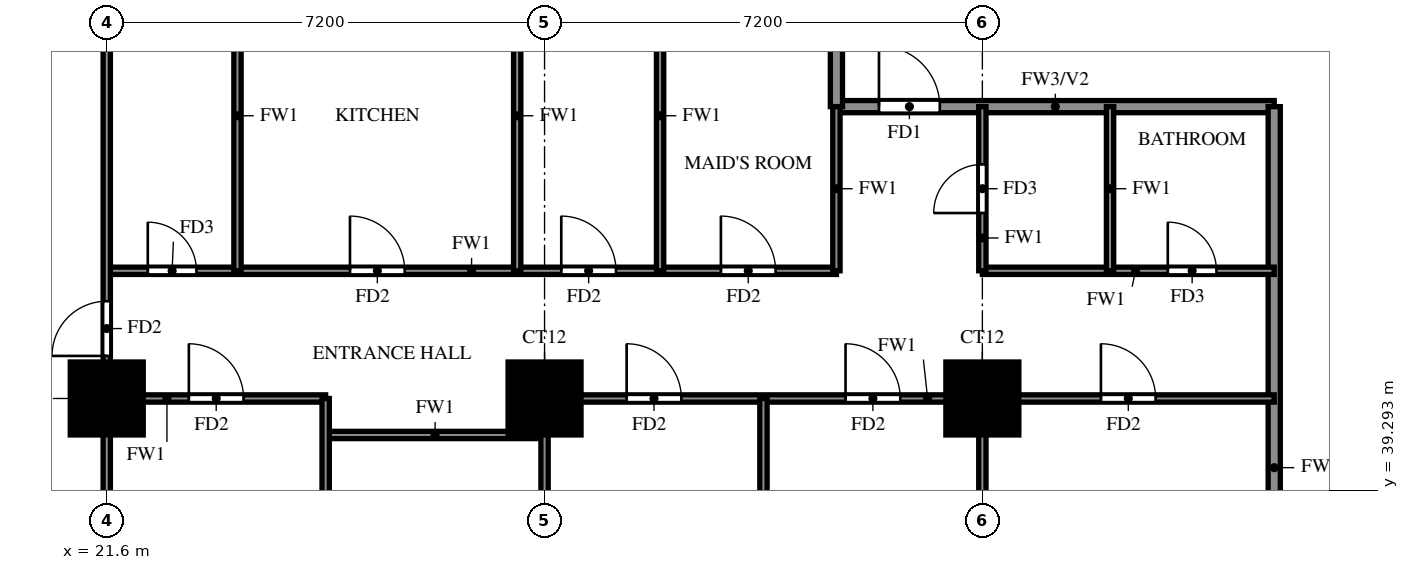
"""IFC4 building model, lengths in metres.
Left out: names, types, materials, properties, quantities, classifications, styles, units other than length and angle.
Written with IfcOpenShell. Run it as: python <this file> out.ifc"""

import sys

from ifc_helpers import new_model, si_unit, direction, frame, frame_2d, origin, origin_2d, place, context, subcontext, project, spatial, rectangle, extrude, source, transform, mapped, element, fill, save


model = new_model("IFC4")
c1 = context("Model", 3, precision=1e-05, world=origin(), true_north=direction((0.0, 1.0)))
c2 = subcontext(c1, "Body", "Model", "MODEL_VIEW")
j1 = project(units=[si_unit("LENGTHUNIT", "METRE"), si_unit("PLANEANGLEUNIT", "RADIAN")], contexts=[c1])
p1 = place(None, origin())
s1 = spatial("IfcSite", under=j1, at=p1, CompositionType="ELEMENT")
p2 = place(p1, origin())
s2 = spatial("IfcBuilding", under=s1, at=p2, CompositionType="ELEMENT")
p3 = place(p2, frame((0.0, 0.0, 93.5)))
s3 = spatial("IfcBuildingStorey", under=s2, at=p3, CompositionType="ELEMENT", Elevation=93.5)
m1 = source(origin(), c2, "Body", "SweptSolid", [
    extrude(rectangle(XDim=1.2, YDim=1.2, at=origin_2d()), origin(), (0.0, 0.0, 1.0), 3.18),
])
for number, where, z_axis, x_axis in (
    (1, (21.6, 40.8, 0.0), (0.0, 0.0, 1.0), (1.0, 0.0, 0.0)),
    (2, (28.8, 40.8, 0.0), (0.0, 0.0, 1.0), (1.0, 0.0, 0.0)),
    (3, (36.0, 40.8, 0.0), (0.0, 0.0, 1.0), (1.0, 0.0, 0.0)),
):
    element("IfcColumn", number, at=place(p3, frame(where, z_axis=z_axis, x_axis=x_axis)), inside=s3, PredefinedType="COLUMN", context=c2, shape_type="MappedRepresentation", body=[
        mapped(m1, transform((0.0, 0.0, 0.0))),
    ])
p4 = place(p3, frame((33.6, 45.6, 0.0), z_axis=(0.0, 0.0, 1.0), x_axis=(1.0, 0.0, 0.0)))
e4 = element("IfcWall", 4, at=p4, inside=s3, PredefinedType="SOLIDWALL", context=c2, shape_type="SweptSolid", body=[
    extrude(rectangle(XDim=7.2, YDim=0.2, at=frame_2d((3.6, 0.0))), origin(), (0.0, 0.0, 1.0), 3.18),
])
p5 = place(p4, frame((0.7, 0.0, 0.0)))
e5 = element("IfcOpeningElement", 5, at=p5, cuts=e4, PredefinedType="OPENING", context=c2, shape_type="SweptSolid", body=[
    extrude(rectangle(XDim=1.0, YDim=2.1, at=frame_2d((0.5, 1.05))), frame((0.0, 0.11, 0.0), z_axis=(0.0, -1.0, 0.0), x_axis=(1.0, 0.0, 0.0)), (0.0, 0.0, 1.0), 0.22),
])
p6 = place(p3, frame((33.6, 45.6, 0.0), z_axis=(0.0, 0.0, 1.0), x_axis=(0.0, 1.0, 0.0)))
e6 = element("IfcWall", 6, at=p6, inside=s3, PredefinedType="SOLIDWALL", context=c2, shape_type="SweptSolid", body=[
    extrude(rectangle(XDim=8.4, YDim=0.2, at=frame_2d((4.2, 0.0))), origin(), (0.0, 0.0, 1.0), 3.18),
])
p7 = place(p3, frame((40.8, 33.725, 0.0), z_axis=(0.0, 0.0, 1.0), x_axis=(0.0, 1.0, 0.0)))
e7 = element("IfcWall", 7, at=p7, inside=s3, PredefinedType="SOLIDWALL", context=c2, shape_type="SweptSolid", body=[
    extrude(rectangle(XDim=11.875, YDim=0.2, at=frame_2d((5.938, 0.0))), origin(), (0.0, 0.0, 1.0), 2.28),
])
p8 = place(p3, frame((25.2, 40.2, 0.0), z_axis=(0.0, 0.0, 1.0), x_axis=(1.0, 0.0, 0.0)))
e8 = element("IfcWall", 8, at=p8, inside=s3, PredefinedType="PARTITIONING", context=c2, shape_type="SweptSolid", body=[
    extrude(rectangle(XDim=3.6, YDim=0.12, at=frame_2d((1.8, 0.0))), origin(), (0.0, 0.0, 1.0), 3.18),
])
p9 = place(p3, frame((21.6, 40.8, 0.0), z_axis=(0.0, 0.0, 1.0), x_axis=(1.0, 0.0, 0.0)))
e9 = element("IfcWall", 9, at=p9, inside=s3, PredefinedType="PARTITIONING", context=c2, shape_type="SweptSolid", body=[
    extrude(rectangle(XDim=3.6, YDim=0.12, at=frame_2d((1.8, 0.0))), origin(), (0.0, 0.0, 1.0), 3.18),
])
p10 = place(p9, frame((1.35, 0.0, 0.0)))
e10 = element("IfcOpeningElement", 10, at=p10, cuts=e9, PredefinedType="OPENING", context=c2, shape_type="SweptSolid", body=[
    extrude(rectangle(XDim=0.9, YDim=2.1, at=frame_2d((0.45, 1.05))), frame((0.0, 0.07, 0.0), z_axis=(0.0, -1.0, 0.0), x_axis=(1.0, 0.0, 0.0)), (0.0, 0.0, 1.0), 0.14),
])
p11 = place(p3, frame((28.8, 40.8, 0.0), z_axis=(0.0, 0.0, 1.0), x_axis=(1.0, 0.0, 0.0)))
e11 = element("IfcWall", 11, at=p11, inside=s3, PredefinedType="PARTITIONING", context=c2, shape_type="SweptSolid", body=[
    extrude(rectangle(XDim=12.0, YDim=0.12, at=frame_2d((6.0, 0.0))), origin(), (0.0, 0.0, 1.0), 3.18),
])
p12 = place(p11, frame((1.35, 0.0, 0.0)))
e12 = element("IfcOpeningElement", 12, at=p12, cuts=e11, PredefinedType="OPENING", context=c2, shape_type="SweptSolid", body=[
    extrude(rectangle(XDim=0.9, YDim=2.1, at=frame_2d((0.45, 1.05))), frame((0.0, 0.07, 0.0), z_axis=(0.0, -1.0, 0.0), x_axis=(1.0, 0.0, 0.0)), (0.0, 0.0, 1.0), 0.14),
])
p13 = place(p11, frame((4.95, 0.0, 0.0)))
e13 = element("IfcOpeningElement", 13, at=p13, cuts=e11, PredefinedType="OPENING", context=c2, shape_type="SweptSolid", body=[
    extrude(rectangle(XDim=0.9, YDim=2.1, at=frame_2d((0.45, 1.05))), frame((0.0, 0.07, 0.0), z_axis=(0.0, -1.0, 0.0), x_axis=(1.0, 0.0, 0.0)), (0.0, 0.0, 1.0), 0.14),
])
p14 = place(p11, frame((9.15, 0.0, 0.0)))
e14 = element("IfcOpeningElement", 14, at=p14, cuts=e11, PredefinedType="OPENING", context=c2, shape_type="SweptSolid", body=[
    extrude(rectangle(XDim=0.9, YDim=2.1, at=frame_2d((0.45, 1.05))), frame((0.0, 0.07, 0.0), z_axis=(0.0, -1.0, 0.0), x_axis=(1.0, 0.0, 0.0)), (0.0, 0.0, 1.0), 0.14),
])
p15 = place(p3, frame((21.6, 42.9, 0.0), z_axis=(0.0, 0.0, 1.0), x_axis=(1.0, 0.0, 0.0)))
e15 = element("IfcWall", 15, at=p15, inside=s3, PredefinedType="PARTITIONING", context=c2, shape_type="SweptSolid", body=[
    extrude(rectangle(XDim=12.0, YDim=0.12, at=frame_2d((6.0, 0.0))), origin(), (0.0, 0.0, 1.0), 3.18),
])
p16 = place(p15, frame((0.675, 0.0, 0.0)))
e16 = element("IfcOpeningElement", 16, at=p16, cuts=e15, PredefinedType="OPENING", context=c2, shape_type="SweptSolid", body=[
    extrude(rectangle(XDim=0.8, YDim=2.1, at=frame_2d((0.4, 1.05))), frame((0.0, 0.07, 0.0), z_axis=(0.0, -1.0, 0.0), x_axis=(1.0, 0.0, 0.0)), (0.0, 0.0, 1.0), 0.14),
])
p17 = place(p15, frame((4.0, 0.0, 0.0)))
e17 = element("IfcOpeningElement", 17, at=p17, cuts=e15, PredefinedType="OPENING", context=c2, shape_type="SweptSolid", body=[
    extrude(rectangle(XDim=0.9, YDim=2.1, at=frame_2d((0.45, 1.05))), frame((0.0, 0.07, 0.0), z_axis=(0.0, -1.0, 0.0), x_axis=(1.0, 0.0, 0.0)), (0.0, 0.0, 1.0), 0.14),
])
p18 = place(p15, frame((7.475, 0.0, 0.0)))
e18 = element("IfcOpeningElement", 18, at=p18, cuts=e15, PredefinedType="OPENING", context=c2, shape_type="SweptSolid", body=[
    extrude(rectangle(XDim=0.9, YDim=2.1, at=frame_2d((0.45, 1.05))), frame((0.0, 0.07, 0.0), z_axis=(0.0, -1.0, 0.0), x_axis=(1.0, 0.0, 0.0)), (0.0, 0.0, 1.0), 0.14),
])
p19 = place(p15, frame((10.1, 0.0, 0.0)))
e19 = element("IfcOpeningElement", 19, at=p19, cuts=e15, PredefinedType="OPENING", context=c2, shape_type="SweptSolid", body=[
    extrude(rectangle(XDim=0.9, YDim=2.1, at=frame_2d((0.45, 1.05))), frame((0.0, 0.07, 0.0), z_axis=(0.0, -1.0, 0.0), x_axis=(1.0, 0.0, 0.0)), (0.0, 0.0, 1.0), 0.14),
])
p20 = place(p3, frame((36.0, 42.9, 0.0), z_axis=(0.0, 0.0, 1.0), x_axis=(1.0, 0.0, 0.0)))
e20 = element("IfcWall", 20, at=p20, inside=s3, PredefinedType="PARTITIONING", context=c2, shape_type="SweptSolid", body=[
    extrude(rectangle(XDim=4.8, YDim=0.12, at=frame_2d((2.4, 0.0))), origin(), (0.0, 0.0, 1.0), 3.18),
])
p21 = place(p20, frame((3.05, 0.0, 0.0)))
e21 = element("IfcOpeningElement", 21, at=p21, cuts=e20, PredefinedType="OPENING", context=c2, shape_type="SweptSolid", body=[
    extrude(rectangle(XDim=0.8, YDim=2.1, at=frame_2d((0.4, 1.05))), frame((0.0, 0.07, 0.0), z_axis=(0.0, -1.0, 0.0), x_axis=(1.0, 0.0, 0.0)), (0.0, 0.0, 1.0), 0.14),
])
p22 = place(p3, frame((21.6, 33.725, 0.0), z_axis=(0.0, 0.0, 1.0), x_axis=(0.0, 1.0, 0.0)))
e22 = element("IfcWall", 22, at=p22, inside=s3, PredefinedType="PARTITIONING", context=c2, shape_type="SweptSolid", body=[
    extrude(rectangle(XDim=28.675, YDim=0.12, at=frame_2d((14.337, 0.0))), origin(), (0.0, 0.0, 1.0), 3.18),
])
p23 = place(p22, frame((7.775, 0.0, 0.0)))
e23 = element("IfcOpeningElement", 23, at=p23, cuts=e22, PredefinedType="OPENING", context=c2, shape_type="SweptSolid", body=[
    extrude(rectangle(XDim=0.9, YDim=2.1, at=frame_2d((0.45, 1.05))), frame((0.0, 0.07, 0.0), z_axis=(0.0, -1.0, 0.0), x_axis=(1.0, 0.0, 0.0)), (0.0, 0.0, 1.0), 0.14),
])
p24 = place(p22, frame((17.125, 0.0, 0.0)))
e24 = element("IfcOpeningElement", 24, at=p24, cuts=e22, PredefinedType="OPENING", context=c2, shape_type="SweptSolid", body=[
    extrude(rectangle(XDim=1.5, YDim=2.1, at=frame_2d((0.75, 1.05))), frame((0.0, 0.07, 0.0), z_axis=(0.0, -1.0, 0.0), x_axis=(1.0, 0.0, 0.0)), (0.0, 0.0, 1.0), 0.14),
])
p25 = place(p22, frame((22.825, 0.0, 0.0)))
e25 = element("IfcOpeningElement", 25, at=p25, cuts=e22, PredefinedType="OPENING", context=c2, shape_type="SweptSolid", body=[
    extrude(rectangle(XDim=0.9, YDim=2.1, at=frame_2d((0.45, 1.05))), frame((0.0, 0.07, 0.0), z_axis=(0.0, -1.0, 0.0), x_axis=(1.0, 0.0, 0.0)), (0.0, 0.0, 1.0), 0.14),
])
p26 = place(p22, frame((26.425, 0.0, 0.0)))
e26 = element("IfcOpeningElement", 26, at=p26, cuts=e22, PredefinedType="OPENING", context=c2, shape_type="SweptSolid", body=[
    extrude(rectangle(XDim=0.9, YDim=2.1, at=frame_2d((0.45, 1.05))), frame((0.0, 0.07, 0.0), z_axis=(0.0, -1.0, 0.0), x_axis=(1.0, 0.0, 0.0)), (0.0, 0.0, 1.0), 0.14),
])
p27 = place(p3, frame((23.75, 42.9, 0.0), z_axis=(0.0, 0.0, 1.0), x_axis=(0.0, 1.0, 0.0)))
e27 = element("IfcWall", 27, at=p27, inside=s3, PredefinedType="PARTITIONING", context=c2, shape_type="SweptSolid", body=[
    extrude(rectangle(XDim=5.1, YDim=0.12, at=frame_2d((2.55, 0.0))), origin(), (0.0, 0.0, 1.0), 3.18),
])
p28 = place(p3, frame((25.2, 33.725, 0.0), z_axis=(0.0, 0.0, 1.0), x_axis=(0.0, 1.0, 0.0)))
e28 = element("IfcWall", 28, at=p28, inside=s3, PredefinedType="PARTITIONING", context=c2, shape_type="SweptSolid", body=[
    extrude(rectangle(XDim=7.075, YDim=0.12, at=frame_2d((3.538, 0.0))), origin(), (0.0, 0.0, 1.0), 2.28),
])
p29 = place(p28, frame((2.837, 0.0, 0.0)))
e29 = element("IfcOpeningElement", 29, at=p29, cuts=e28, PredefinedType="OPENING", context=c2, shape_type="SweptSolid", body=[
    extrude(rectangle(XDim=0.8, YDim=2.1, at=frame_2d((0.4, 1.05))), frame((0.0, 0.07, 0.0), z_axis=(0.0, -1.0, 0.0), x_axis=(1.0, 0.0, 0.0)), (0.0, 0.0, 1.0), 0.14),
])
p30 = place(p3, frame((28.35, 42.9, 0.0), z_axis=(0.0, 0.0, 1.0), x_axis=(0.0, 1.0, 0.0)))
e30 = element("IfcWall", 30, at=p30, inside=s3, PredefinedType="PARTITIONING", context=c2, shape_type="SweptSolid", body=[
    extrude(rectangle(XDim=5.1, YDim=0.12, at=frame_2d((2.55, 0.0))), origin(), (0.0, 0.0, 1.0), 3.18),
])
p31 = place(p3, frame((28.8, 33.725, 0.0), z_axis=(0.0, 0.0, 1.0), x_axis=(0.0, 1.0, 0.0)))
e31 = element("IfcWall", 31, at=p31, inside=s3, PredefinedType="PARTITIONING", context=c2, shape_type="SweptSolid", body=[
    extrude(rectangle(XDim=7.075, YDim=0.12, at=frame_2d((3.538, 0.0))), origin(), (0.0, 0.0, 1.0), 3.18),
])
p32 = place(p3, frame((30.7, 42.9, 0.0), z_axis=(0.0, 0.0, 1.0), x_axis=(0.0, 1.0, 0.0)))
e32 = element("IfcWall", 32, at=p32, inside=s3, PredefinedType="PARTITIONING", context=c2, shape_type="SweptSolid", body=[
    extrude(rectangle(XDim=5.1, YDim=0.12, at=frame_2d((2.55, 0.0))), origin(), (0.0, 0.0, 1.0), 3.18),
])
p33 = place(p3, frame((32.4, 33.725, 0.0), z_axis=(0.0, 0.0, 1.0), x_axis=(0.0, 1.0, 0.0)))
e33 = element("IfcWall", 33, at=p33, inside=s3, PredefinedType="PARTITIONING", context=c2, shape_type="SweptSolid", body=[
    extrude(rectangle(XDim=7.075, YDim=0.12, at=frame_2d((3.538, 0.0))), origin(), (0.0, 0.0, 1.0), 2.28),
])
p34 = place(p3, frame((33.6, 42.9, 0.0), z_axis=(0.0, 0.0, 1.0), x_axis=(0.0, 1.0, 0.0)))
e34 = element("IfcWall", 34, at=p34, inside=s3, PredefinedType="PARTITIONING", context=c2, shape_type="SweptSolid", body=[
    extrude(rectangle(XDim=2.7, YDim=0.12, at=frame_2d((1.35, 0.0))), origin(), (0.0, 0.0, 1.0), 3.18),
])
p35 = place(p3, frame((36.0, 33.725, 0.0), z_axis=(0.0, 0.0, 1.0), x_axis=(0.0, 1.0, 0.0)))
e35 = element("IfcWall", 35, at=p35, inside=s3, PredefinedType="PARTITIONING", context=c2, shape_type="SweptSolid", body=[
    extrude(rectangle(XDim=7.075, YDim=0.12, at=frame_2d((3.538, 0.0))), origin(), (0.0, 0.0, 1.0), 3.18),
])
p36 = place(p3, frame((36.0, 42.9, 0.0), z_axis=(0.0, 0.0, 1.0), x_axis=(0.0, 1.0, 0.0)))
e36 = element("IfcWall", 36, at=p36, inside=s3, PredefinedType="PARTITIONING", context=c2, shape_type="SweptSolid", body=[
    extrude(rectangle(XDim=2.7, YDim=0.12, at=frame_2d((1.35, 0.0))), origin(), (0.0, 0.0, 1.0), 3.18),
])
p37 = place(p36, frame((0.95, 0.0, 0.0)))
e37 = element("IfcOpeningElement", 37, at=p37, cuts=e36, PredefinedType="OPENING", context=c2, shape_type="SweptSolid", body=[
    extrude(rectangle(XDim=0.8, YDim=2.1, at=frame_2d((0.4, 1.05))), frame((0.0, 0.07, 0.0), z_axis=(0.0, -1.0, 0.0), x_axis=(1.0, 0.0, 0.0)), (0.0, 0.0, 1.0), 0.14),
])
p38 = place(p3, frame((38.1, 42.9, 0.0), z_axis=(0.0, 0.0, 1.0), x_axis=(0.0, 1.0, 0.0)))
e38 = element("IfcWall", 38, at=p38, inside=s3, PredefinedType="PARTITIONING", context=c2, shape_type="SweptSolid", body=[
    extrude(rectangle(XDim=2.7, YDim=0.12, at=frame_2d((1.35, 0.0))), origin(), (0.0, 0.0, 1.0), 3.18),
])
p39 = place(p5, origin())
e39 = element("IfcDoor", 39, at=p39, inside=s3, OperationType="SINGLE_SWING_RIGHT", PredefinedType="DOOR", context=c2, shape_type="SweptSolid", body=[
    extrude(rectangle(XDim=1.0, YDim=2.1, at=frame_2d((0.5, 1.05))), frame((0.0, 0.025, 0.0), z_axis=(0.0, -1.0, 0.0), x_axis=(1.0, 0.0, 0.0)), (0.0, 0.0, 1.0), 0.05),
])
fill(e5, e39)
p40 = place(p23, origin())
e40 = element("IfcDoor", 40, at=p40, inside=s3, OperationType="SINGLE_SWING_RIGHT", PredefinedType="DOOR", context=c2, shape_type="SweptSolid", body=[
    extrude(rectangle(XDim=0.9, YDim=2.1, at=frame_2d((0.45, 1.05))), frame((0.0, 0.025, 0.0), z_axis=(0.0, -1.0, 0.0), x_axis=(1.0, 0.0, 0.0)), (0.0, 0.0, 1.0), 0.05),
])
fill(e23, e40)
p41 = place(p10, origin())
e41 = element("IfcDoor", 41, at=p41, inside=s3, OperationType="SINGLE_SWING_LEFT", PredefinedType="DOOR", context=c2, shape_type="SweptSolid", body=[
    extrude(rectangle(XDim=0.9, YDim=2.1, at=frame_2d((0.45, 1.05))), frame((0.0, 0.025, 0.0), z_axis=(0.0, -1.0, 0.0), x_axis=(1.0, 0.0, 0.0)), (0.0, 0.0, 1.0), 0.05),
])
fill(e10, e41)
p42 = place(p12, origin())
e42 = element("IfcDoor", 42, at=p42, inside=s3, OperationType="SINGLE_SWING_LEFT", PredefinedType="DOOR", context=c2, shape_type="SweptSolid", body=[
    extrude(rectangle(XDim=0.9, YDim=2.1, at=frame_2d((0.45, 1.05))), frame((0.0, 0.025, 0.0), z_axis=(0.0, -1.0, 0.0), x_axis=(1.0, 0.0, 0.0)), (0.0, 0.0, 1.0), 0.05),
])
fill(e12, e42)
p43 = place(p13, origin())
e43 = element("IfcDoor", 43, at=p43, inside=s3, OperationType="SINGLE_SWING_LEFT", PredefinedType="DOOR", context=c2, shape_type="SweptSolid", body=[
    extrude(rectangle(XDim=0.9, YDim=2.1, at=frame_2d((0.45, 1.05))), frame((0.0, 0.025, 0.0), z_axis=(0.0, -1.0, 0.0), x_axis=(1.0, 0.0, 0.0)), (0.0, 0.0, 1.0), 0.05),
])
fill(e13, e43)
p44 = place(p14, origin())
e44 = element("IfcDoor", 44, at=p44, inside=s3, OperationType="SINGLE_SWING_RIGHT", PredefinedType="DOOR", context=c2, shape_type="SweptSolid", body=[
    extrude(rectangle(XDim=0.9, YDim=2.1, at=frame_2d((0.45, 1.05))), frame((0.0, 0.025, 0.0), z_axis=(0.0, -1.0, 0.0), x_axis=(1.0, 0.0, 0.0)), (0.0, 0.0, 1.0), 0.05),
])
fill(e14, e44)
p45 = place(p16, origin())
e45 = element("IfcDoor", 45, at=p45, inside=s3, OperationType="SINGLE_SWING_LEFT", PredefinedType="DOOR", context=c2, shape_type="SweptSolid", body=[
    extrude(rectangle(XDim=0.8, YDim=2.1, at=frame_2d((0.4, 1.05))), frame((0.0, 0.025, 0.0), z_axis=(0.0, -1.0, 0.0), x_axis=(1.0, 0.0, 0.0)), (0.0, 0.0, 1.0), 0.05),
])
fill(e16, e45)
p46 = place(p17, origin())
e46 = element("IfcDoor", 46, at=p46, inside=s3, OperationType="SINGLE_SWING_LEFT", PredefinedType="DOOR", context=c2, shape_type="SweptSolid", body=[
    extrude(rectangle(XDim=0.9, YDim=2.1, at=frame_2d((0.45, 1.05))), frame((0.0, 0.025, 0.0), z_axis=(0.0, -1.0, 0.0), x_axis=(1.0, 0.0, 0.0)), (0.0, 0.0, 1.0), 0.05),
])
fill(e17, e46)
p47 = place(p18, origin())
e47 = element("IfcDoor", 47, at=p47, inside=s3, OperationType="SINGLE_SWING_RIGHT", PredefinedType="DOOR", context=c2, shape_type="SweptSolid", body=[
    extrude(rectangle(XDim=0.9, YDim=2.1, at=frame_2d((0.45, 1.05))), frame((0.0, 0.025, 0.0), z_axis=(0.0, -1.0, 0.0), x_axis=(1.0, 0.0, 0.0)), (0.0, 0.0, 1.0), 0.05),
])
fill(e18, e47)
p48 = place(p19, origin())
e48 = element("IfcDoor", 48, at=p48, inside=s3, OperationType="SINGLE_SWING_LEFT", PredefinedType="DOOR", context=c2, shape_type="SweptSolid", body=[
    extrude(rectangle(XDim=0.9, YDim=2.1, at=frame_2d((0.45, 1.05))), frame((0.0, 0.025, 0.0), z_axis=(0.0, -1.0, 0.0), x_axis=(1.0, 0.0, 0.0)), (0.0, 0.0, 1.0), 0.05),
])
fill(e19, e48)
p49 = place(p37, origin())
e49 = element("IfcDoor", 49, at=p49, inside=s3, OperationType="SINGLE_SWING_LEFT", PredefinedType="DOOR", context=c2, shape_type="SweptSolid", body=[
    extrude(rectangle(XDim=0.8, YDim=2.1, at=frame_2d((0.4, 1.05))), frame((0.0, 0.025, 0.0), z_axis=(0.0, -1.0, 0.0), x_axis=(1.0, 0.0, 0.0)), (0.0, 0.0, 1.0), 0.05),
])
fill(e37, e49)
p50 = place(p21, origin())
e50 = element("IfcDoor", 50, at=p50, inside=s3, OperationType="SINGLE_SWING_RIGHT", PredefinedType="DOOR", context=c2, shape_type="SweptSolid", body=[
    extrude(rectangle(XDim=0.8, YDim=2.1, at=frame_2d((0.4, 1.05))), frame((0.0, 0.025, 0.0), z_axis=(0.0, -1.0, 0.0), x_axis=(1.0, 0.0, 0.0)), (0.0, 0.0, 1.0), 0.05),
])
fill(e21, e50)
save(model, sys.argv[1])
